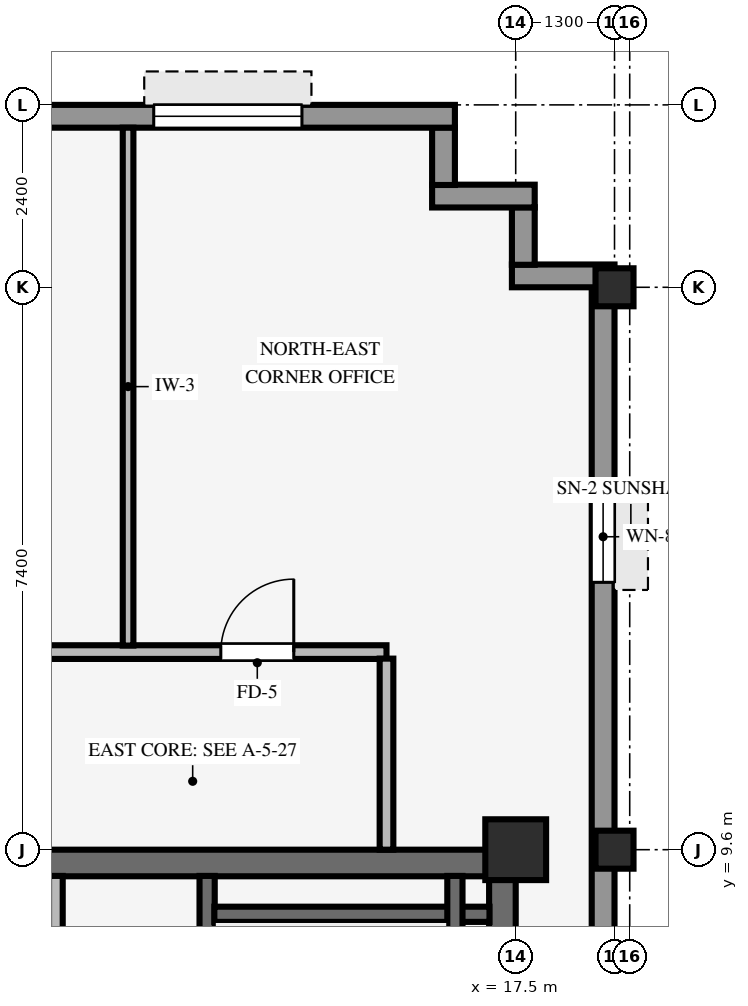
"""IFC4 building model, lengths in metres.
Left out: names, types, materials, properties, quantities, classifications, styles, units other than length and angle.
Written with IfcOpenShell. Run it as: python <this file> out.ifc"""

import sys

from ifc_helpers import new_model, si_unit, direction, frame, frame_2d, origin, origin_2d, place, context, subcontext, project, spatial, rectangle, hollow_rectangle, extrude, source, transform, mapped, element, fill, save


model = new_model("IFC4")
c1 = context("Model", 3, precision=1e-05, world=origin(), true_north=direction((0.0, 1.0)))
c2 = subcontext(c1, "Body", "Model", "MODEL_VIEW")
j1 = project(units=[si_unit("LENGTHUNIT", "METRE"), si_unit("PLANEANGLEUNIT", "RADIAN")], contexts=[c1])
p1 = place(None, origin())
s1 = spatial("IfcSite", under=j1, at=p1, CompositionType="ELEMENT")
p2 = place(p1, origin())
s2 = spatial("IfcBuilding", under=s1, at=p2, CompositionType="ELEMENT")
p3 = place(p2, frame((0.0, 0.0, 234.7)))
s3 = spatial("IfcBuildingStorey", under=s2, at=p3, CompositionType="ELEMENT", Elevation=234.7)
p4 = place(p3, frame((9.0, 9.425, 0.0), z_axis=(0.0, 0.0, 1.0), x_axis=(1.0, 0.0, 0.0)))
e1 = element("IfcWall", 1, at=p4, inside=s3, PredefinedType="SHEAR", context=c2, shape_type="SweptSolid", body=[
    extrude(rectangle(XDim=8.5, YDim=0.35, at=frame_2d((4.25, 0.0))), origin(), (0.0, 0.0, 1.0), 3.37),
])
p5 = place(p3, frame((17.325, -9.255, 0.0), z_axis=(0.0, 0.0, 1.0), x_axis=(0.0, 1.0, 0.0)))
e2 = element("IfcWall", 2, at=p5, inside=s3, PredefinedType="SHEAR", context=c2, shape_type="SweptSolid", body=[
    extrude(rectangle(XDim=18.51, YDim=0.35, at=frame_2d((9.255, 0.0))), origin(), (0.0, 0.0, 1.0), 3.37),
])
p6 = place(p3, frame((17.5, 9.6, 0.0), z_axis=(0.0, 0.0, 1.0), x_axis=(1.0, 0.0, 0.0)))
e3 = element("IfcColumn", 3, at=p6, inside=s3, PredefinedType="COLUMN", context=c2, shape_type="SweptSolid", body=[
    extrude(rectangle(XDim=0.8, YDim=0.8, at=origin_2d()), origin(), (0.0, 0.0, 1.0), 3.37),
])
for number, where, z_axis, x_axis in (
    (4, (18.8, 9.6, 0.0), (0.0, 0.0, 1.0), (1.0, 0.0, 0.0)),
    (5, (18.8, 17.0, 0.0), (0.0, 0.0, 1.0), (1.0, 0.0, 0.0)),
):
    element("IfcColumn", number, at=place(p3, frame(where, z_axis=z_axis, x_axis=x_axis)), inside=s3, PredefinedType="COLUMN", context=c2, shape_type="SweptSolid", body=[
        extrude(hollow_rectangle(XDim=0.5, YDim=0.5, WallThickness=0.032, InnerFilletRadius=0.032, OuterFilletRadius=0.064, at=origin_2d()), origin(), (0.0, 0.0, 1.0), 3.37),
    ])
p7 = place(p3, frame((18.65, -17.004, 0.0), z_axis=(0.0, 0.0, 1.0), x_axis=(0.0, 1.0, 0.0)))
e6 = element("IfcWall", 6, at=p7, inside=s3, PredefinedType="STANDARD", context=c2, shape_type="SweptSolid", body=[
    extrude(rectangle(XDim=34.008, YDim=0.3, at=frame_2d((17.004, 0.0))), origin(), (0.0, 0.0, 1.0), 2.705),
])
p8 = place(p7, frame((2.686, 0.0, 0.8)))
e7 = element("IfcOpeningElement", 7, at=p8, cuts=e6, PredefinedType="OPENING", context=c2, shape_type="SweptSolid", body=[
    extrude(rectangle(XDim=1.2, YDim=1.48, at=frame_2d((0.6, 0.74))), frame((0.0, 0.16, 0.0), z_axis=(0.0, -1.0, 0.0), x_axis=(1.0, 0.0, 0.0)), (0.0, 0.0, 1.0), 0.32),
])
p9 = place(p7, frame((30.122, 0.0, 0.8)))
e8 = element("IfcOpeningElement", 8, at=p9, cuts=e6, PredefinedType="OPENING", context=c2, shape_type="SweptSolid", body=[
    extrude(rectangle(XDim=1.2, YDim=1.48, at=frame_2d((0.6, 0.74))), frame((0.0, 0.16, 0.0), z_axis=(0.0, -1.0, 0.0), x_axis=(1.0, 0.0, 0.0)), (0.0, 0.0, 1.0), 0.32),
])
p10 = place(p3, frame((17.45, 17.15, 0.0), z_axis=(0.0, 0.0, 1.0), x_axis=(1.0, 0.0, 0.0)))
e9 = element("IfcWall", 9, at=p10, inside=s3, PredefinedType="STANDARD", context=c2, shape_type="SweptSolid", body=[
    extrude(rectangle(XDim=1.35, YDim=0.3, at=frame_2d((0.675, 0.0))), origin(), (0.0, 0.0, 1.0), 2.892),
])
p11 = place(p3, frame((17.6, 17.296, 0.0), z_axis=(0.0, 0.0, 1.0), x_axis=(0.0, 1.0, 0.0)))
e10 = element("IfcWall", 10, at=p11, inside=s3, PredefinedType="STANDARD", context=c2, shape_type="SweptSolid", body=[
    extrude(rectangle(XDim=0.758, YDim=0.3, at=frame_2d((0.379, 0.0))), origin(), (0.0, 0.0, 1.0), 2.892),
])
p12 = place(p3, frame((16.4, 18.2, 0.0), z_axis=(0.0, 0.0, 1.0), x_axis=(1.0, 0.0, 0.0)))
e11 = element("IfcWall", 11, at=p12, inside=s3, PredefinedType="STANDARD", context=c2, shape_type="SweptSolid", body=[
    extrude(rectangle(XDim=1.35, YDim=0.3, at=frame_2d((0.675, 0.0))), origin(), (0.0, 0.0, 1.0), 2.892),
])
p13 = place(p3, frame((16.55, 18.346, 0.0), z_axis=(0.0, 0.0, 1.0), x_axis=(0.0, 1.0, 0.0)))
e12 = element("IfcWall", 12, at=p13, inside=s3, PredefinedType="STANDARD", context=c2, shape_type="SweptSolid", body=[
    extrude(rectangle(XDim=0.758, YDim=0.3, at=frame_2d((0.379, 0.0))), origin(), (0.0, 0.0, 1.0), 2.892),
])
p14 = place(p3, frame((-24.3, 19.25, 0.0), z_axis=(0.0, 0.0, 1.0), x_axis=(1.0, 0.0, 0.0)))
e13 = element("IfcWall", 13, at=p14, inside=s3, PredefinedType="STANDARD", context=c2, shape_type="SweptSolid", body=[
    extrude(rectangle(XDim=41.0, YDim=0.3, at=frame_2d((20.5, 0.0))), origin(), (0.0, 0.0, 1.0), 2.705),
])
p15 = place(p14, frame((19.0, 0.0, 0.0)))
e14 = element("IfcOpeningElement", 14, at=p15, cuts=e13, PredefinedType="OPENING", context=c2, shape_type="SweptSolid", body=[
    extrude(rectangle(XDim=0.98, YDim=2.15, at=frame_2d((0.49, 1.075))), frame((0.0, 0.16, 0.0), z_axis=(0.0, -1.0, 0.0), x_axis=(1.0, 0.0, 0.0)), (0.0, 0.0, 1.0), 0.32),
])
p16 = place(p14, frame((2.462, 0.0, 0.8)))
e15 = element("IfcOpeningElement", 15, at=p16, cuts=e13, PredefinedType="OPENING", context=c2, shape_type="SweptSolid", body=[
    extrude(rectangle(XDim=1.95, YDim=1.48, at=frame_2d((0.975, 0.74))), frame((0.0, 0.16, 0.0), z_axis=(0.0, -1.0, 0.0), x_axis=(1.0, 0.0, 0.0)), (0.0, 0.0, 1.0), 0.32),
])
p17 = place(p14, frame((7.337, 0.0, 0.8)))
e16 = element("IfcOpeningElement", 16, at=p17, cuts=e13, PredefinedType="OPENING", context=c2, shape_type="SweptSolid", body=[
    extrude(rectangle(XDim=1.95, YDim=1.48, at=frame_2d((0.975, 0.74))), frame((0.0, 0.16, 0.0), z_axis=(0.0, -1.0, 0.0), x_axis=(1.0, 0.0, 0.0)), (0.0, 0.0, 1.0), 0.32),
])
p18 = place(p14, frame((21.512, 0.0, 0.8)))
e17 = element("IfcOpeningElement", 17, at=p18, cuts=e13, PredefinedType="OPENING", context=c2, shape_type="SweptSolid", body=[
    extrude(rectangle(XDim=1.95, YDim=1.48, at=frame_2d((0.975, 0.74))), frame((0.0, 0.16, 0.0), z_axis=(0.0, -1.0, 0.0), x_axis=(1.0, 0.0, 0.0)), (0.0, 0.0, 1.0), 0.32),
])
p19 = place(p14, frame((26.837, 0.0, 0.8)))
e18 = element("IfcOpeningElement", 18, at=p19, cuts=e13, PredefinedType="OPENING", context=c2, shape_type="SweptSolid", body=[
    extrude(rectangle(XDim=1.95, YDim=1.48, at=frame_2d((0.975, 0.74))), frame((0.0, 0.16, 0.0), z_axis=(0.0, -1.0, 0.0), x_axis=(1.0, 0.0, 0.0)), (0.0, 0.0, 1.0), 0.32),
])
p20 = place(p14, frame((37.038, 0.0, 0.8)))
e19 = element("IfcOpeningElement", 19, at=p20, cuts=e13, PredefinedType="OPENING", context=c2, shape_type="SweptSolid", body=[
    extrude(rectangle(XDim=1.95, YDim=1.48, at=frame_2d((0.975, 0.74))), frame((0.0, 0.16, 0.0), z_axis=(0.0, -1.0, 0.0), x_axis=(1.0, 0.0, 0.0)), (0.0, 0.0, 1.0), 0.32),
])
p21 = place(p3, frame((13.44, 0.9, 0.0), z_axis=(0.0, 0.0, 1.0), x_axis=(0.0, 1.0, 0.0)))
e20 = element("IfcWall", 20, at=p21, inside=s3, PredefinedType="SHEAR", context=c2, shape_type="SweptSolid", body=[
    extrude(rectangle(XDim=8.355, YDim=0.2, at=frame_2d((4.177, 0.0))), origin(), (0.0, 0.0, 1.0), 3.37),
])
p22 = place(p21, frame((0.43, 0.0, 0.0)))
e21 = element("IfcOpeningElement", 21, at=p22, cuts=e20, PredefinedType="OPENING", context=c2, shape_type="SweptSolid", body=[
    extrude(rectangle(XDim=1.1, YDim=2.15, at=frame_2d((0.55, 1.075))), frame((0.0, 0.11, 0.0), z_axis=(0.0, -1.0, 0.0), x_axis=(1.0, 0.0, 0.0)), (0.0, 0.0, 1.0), 0.22),
])
p23 = place(p3, frame((13.535, 8.75, 0.0), z_axis=(0.0, 0.0, 1.0), x_axis=(1.0, 0.0, 0.0)))
e22 = element("IfcWall", 22, at=p23, inside=s3, PredefinedType="SHEAR", context=c2, shape_type="SweptSolid", body=[
    extrude(rectangle(XDim=3.62, YDim=0.2, at=frame_2d((1.81, 0.0))), origin(), (0.0, 0.0, 1.0), 3.37),
])
p24 = place(p3, frame((16.7, 1.095, 0.0), z_axis=(0.0, 0.0, 1.0), x_axis=(0.0, 1.0, 0.0)))
e23 = element("IfcWall", 23, at=p24, inside=s3, PredefinedType="SHEAR", context=c2, shape_type="SweptSolid", body=[
    extrude(rectangle(XDim=8.16, YDim=0.2, at=frame_2d((4.08, 0.0))), origin(), (0.0, 0.0, 1.0), 3.37),
])
p25 = place(p3, frame((11.45, 1.49, 0.0), z_axis=(0.0, 0.0, 1.0), x_axis=(0.0, 1.0, 0.0)))
e24 = element("IfcWall", 24, at=p25, inside=s3, PredefinedType="PARTITIONING", context=c2, shape_type="SweptSolid", body=[
    extrude(rectangle(XDim=7.765, YDim=0.18, at=frame_2d((3.882, 0.0))), origin(), (0.0, 0.0, 1.0), 3.36),
])
p26 = place(p3, frame((-15.0, 12.2, 0.0), z_axis=(0.0, 0.0, 1.0), x_axis=(1.0, 0.0, 0.0)))
e25 = element("IfcWall", 25, at=p26, inside=s3, PredefinedType="PARTITIONING", context=c2, shape_type="SweptSolid", body=[
    extrude(rectangle(XDim=30.8, YDim=0.18, at=frame_2d((15.4, 0.0))), origin(), (0.0, 0.0, 1.0), 3.36),
])
p27 = place(p26, frame((11.52, 0.0, 0.0)))
e26 = element("IfcOpeningElement", 26, at=p27, cuts=e25, PredefinedType="OPENING", context=c2, shape_type="SweptSolid", body=[
    extrude(rectangle(XDim=0.96, YDim=2.1, at=frame_2d((0.48, 1.05))), frame((0.0, 0.1, 0.0), z_axis=(0.0, -1.0, 0.0), x_axis=(1.0, 0.0, 0.0)), (0.0, 0.0, 1.0), 0.2),
])
p28 = place(p26, frame((25.22, 0.0, 0.0)))
e27 = element("IfcOpeningElement", 27, at=p28, cuts=e25, PredefinedType="OPENING", context=c2, shape_type="SweptSolid", body=[
    extrude(rectangle(XDim=0.96, YDim=2.1, at=frame_2d((0.48, 1.05))), frame((0.0, 0.1, 0.0), z_axis=(0.0, -1.0, 0.0), x_axis=(1.0, 0.0, 0.0)), (0.0, 0.0, 1.0), 0.2),
])
p29 = place(p26, frame((28.62, 0.0, 0.0)))
e28 = element("IfcOpeningElement", 28, at=p29, cuts=e25, PredefinedType="OPENING", context=c2, shape_type="SweptSolid", body=[
    extrude(rectangle(XDim=0.96, YDim=2.1, at=frame_2d((0.48, 1.05))), frame((0.0, 0.1, 0.0), z_axis=(0.0, -1.0, 0.0), x_axis=(1.0, 0.0, 0.0)), (0.0, 0.0, 1.0), 0.2),
])
p30 = place(p26, frame((3.92, 0.0, 0.0)))
e29 = element("IfcOpeningElement", 29, at=p30, cuts=e25, PredefinedType="OPENING", context=c2, shape_type="SweptSolid", body=[
    extrude(rectangle(XDim=0.96, YDim=2.1, at=frame_2d((0.48, 1.05))), frame((0.0, 0.1, 0.0), z_axis=(0.0, -1.0, 0.0), x_axis=(1.0, 0.0, 0.0)), (0.0, 0.0, 1.0), 0.2),
])
p31 = place(p26, frame((16.2, 0.0, 0.0)))
e30 = element("IfcOpeningElement", 30, at=p31, cuts=e25, PredefinedType="OPENING", context=c2, shape_type="SweptSolid", body=[
    extrude(rectangle(XDim=0.9, YDim=2.1, at=frame_2d((0.45, 1.05))), frame((0.0, 0.1, 0.0), z_axis=(0.0, -1.0, 0.0), x_axis=(1.0, 0.0, 0.0)), (0.0, 0.0, 1.0), 0.2),
])
p32 = place(p26, frame((18.3, 0.0, 0.0)))
e31 = element("IfcOpeningElement", 31, at=p32, cuts=e25, PredefinedType="OPENING", context=c2, shape_type="SweptSolid", body=[
    extrude(rectangle(XDim=0.9, YDim=2.1, at=frame_2d((0.45, 1.05))), frame((0.0, 0.1, 0.0), z_axis=(0.0, -1.0, 0.0), x_axis=(1.0, 0.0, 0.0)), (0.0, 0.0, 1.0), 0.2),
])
p33 = place(p26, frame((20.25, 0.0, 0.0)))
e32 = element("IfcOpeningElement", 32, at=p33, cuts=e25, PredefinedType="OPENING", context=c2, shape_type="SweptSolid", body=[
    extrude(rectangle(XDim=0.9, YDim=2.1, at=frame_2d((0.45, 1.05))), frame((0.0, 0.1, 0.0), z_axis=(0.0, -1.0, 0.0), x_axis=(1.0, 0.0, 0.0)), (0.0, 0.0, 1.0), 0.2),
])
p34 = place(p3, frame((12.4, 12.286, 0.0), z_axis=(0.0, 0.0, 1.0), x_axis=(0.0, 1.0, 0.0)))
e33 = element("IfcWall", 33, at=p34, inside=s3, PredefinedType="PARTITIONING", context=c2, shape_type="SweptSolid", body=[
    extrude(rectangle(XDim=6.814, YDim=0.14, at=frame_2d((3.407, 0.0))), origin(), (0.0, 0.0, 1.0), 3.36),
])
p35 = place(p3, frame((15.8, 9.6, 0.0), z_axis=(0.0, 0.0, 1.0), x_axis=(0.0, 1.0, 0.0)))
e34 = element("IfcWall", 34, at=p35, inside=s3, PredefinedType="PARTITIONING", context=c2, shape_type="SweptSolid", body=[
    extrude(rectangle(XDim=2.514, YDim=0.18, at=frame_2d((1.257, 0.0))), origin(), (0.0, 0.0, 1.0), 3.36),
])
m1 = source(origin(), c2, "Body", "SweptSolid", [
    extrude(rectangle(XDim=1.2, YDim=1.48, at=frame_2d((0.6, 0.74))), frame((0.0, 0.03, 0.0), z_axis=(0.0, -1.0, 0.0), x_axis=(1.0, 0.0, 0.0)), (0.0, 0.0, 1.0), 0.06),
])
p36 = place(p9, origin())
e35 = element("IfcWindow", 35, at=p36, inside=s3, PartitioningType="SINGLE_PANEL", PredefinedType="WINDOW", context=c2, shape_type="MappedRepresentation", body=[
    mapped(m1, transform((0.0, 0.0, 0.0), scale=1.0)),
])
fill(e8, e35)
m2 = source(origin(), c2, "Body", "SweptSolid", [
    extrude(rectangle(XDim=1.95, YDim=1.48, at=frame_2d((0.975, 0.74))), frame((0.0, 0.03, 0.0), z_axis=(0.0, -1.0, 0.0), x_axis=(1.0, 0.0, 0.0)), (0.0, 0.0, 1.0), 0.06),
])
p37 = place(p20, origin())
e36 = element("IfcWindow", 36, at=p37, inside=s3, PartitioningType="SINGLE_PANEL", PredefinedType="WINDOW", context=c2, shape_type="MappedRepresentation", body=[
    mapped(m2, transform((0.0, 0.0, 0.0), scale=1.0)),
])
fill(e19, e36)
m3 = source(origin(), c2, "Body", "SweptSolid", [
    extrude(rectangle(XDim=0.96, YDim=2.1, at=frame_2d((0.48, 1.05))), frame((0.0, 0.025, 0.0), z_axis=(0.0, -1.0, 0.0), x_axis=(1.0, 0.0, 0.0)), (0.0, 0.0, 1.0), 0.05),
])
p38 = place(p29, origin())
e37 = element("IfcDoor", 37, at=p38, inside=s3, OperationType="SINGLE_SWING_RIGHT", PredefinedType="DOOR", context=c2, shape_type="MappedRepresentation", body=[
    mapped(m3, transform((0.0, 0.0, 0.0), scale=1.0)),
])
fill(e28, e37)
save(model, sys.argv[1])
